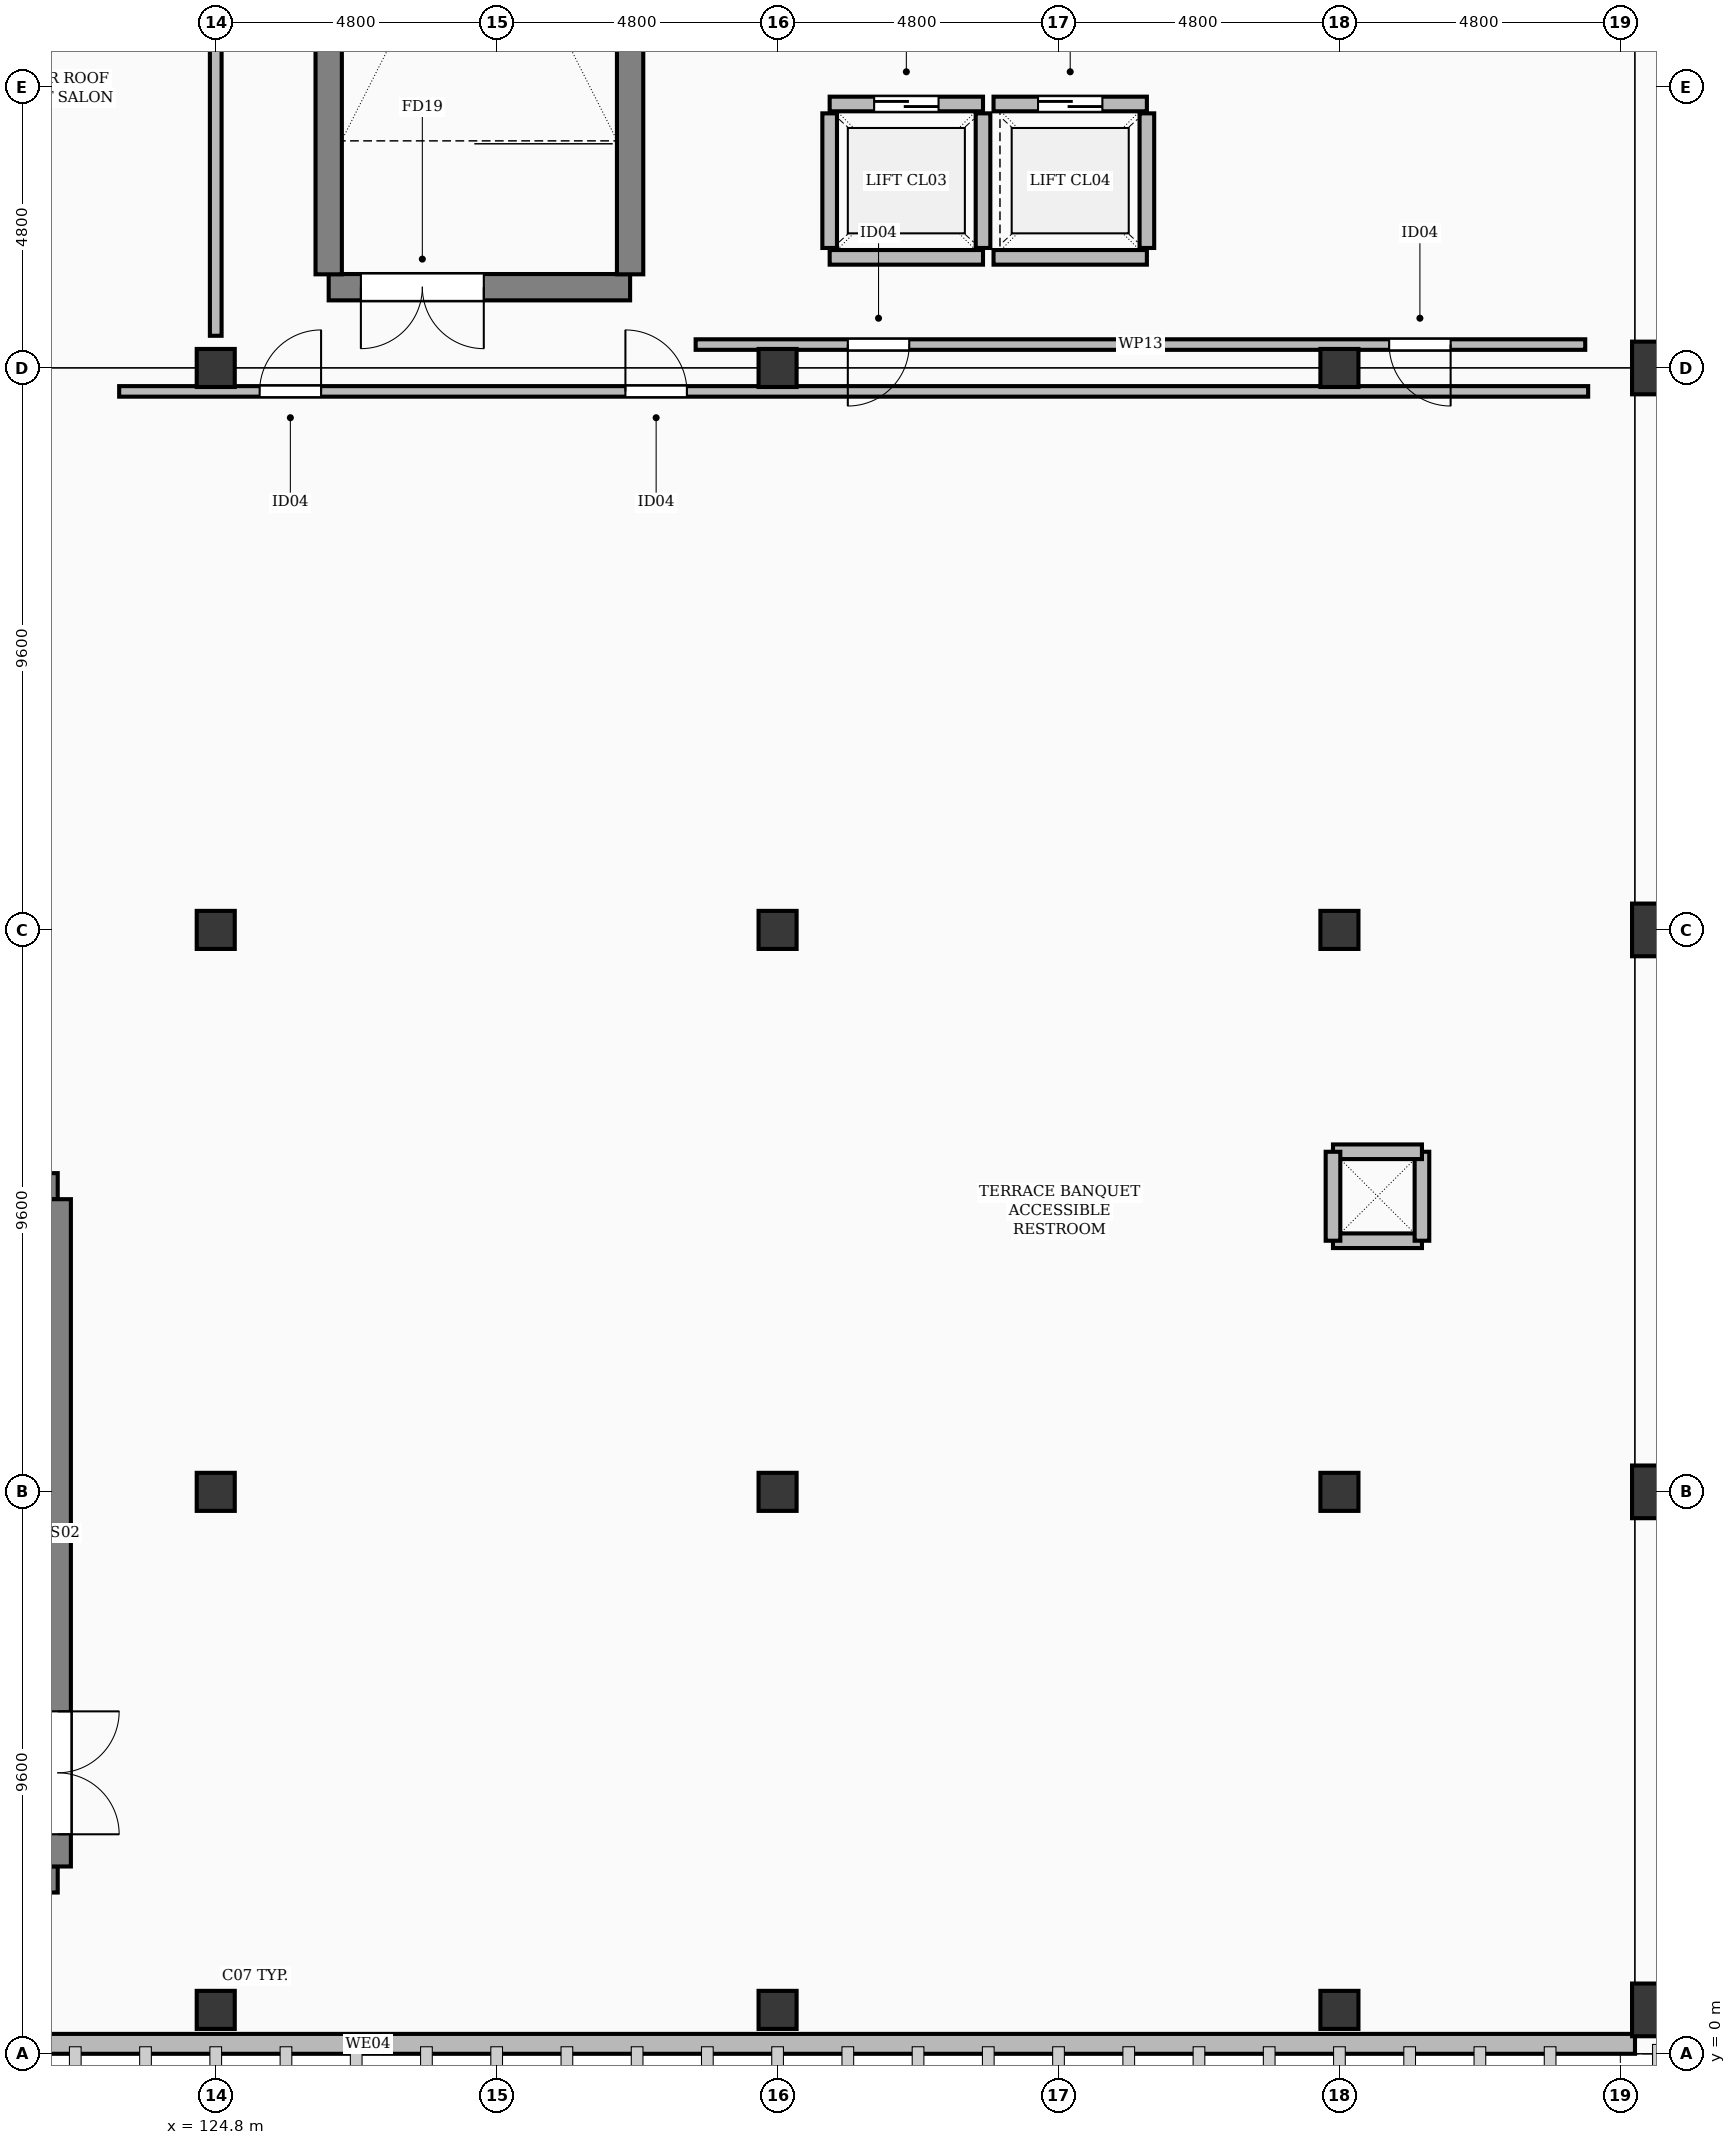
"""IFC4 building model, lengths in metres.
Left out: names, types, materials, properties, quantities, classifications, styles, units other than length and angle.
Written with IfcOpenShell. Run it as: python <this file> out.ifc"""

import sys

from ifc_helpers import new_model, si_unit, direction, frame, frame_2d, origin, origin_2d, place, context, subcontext, project, spatial, rectangle, extrude, element, fill, save


model = new_model("IFC4")
c1 = context("Model", 3, precision=1e-05, world=origin(), true_north=direction((0.0, 1.0)))
c2 = subcontext(c1, "Body", "Model", "MODEL_VIEW")
j1 = project(units=[si_unit("LENGTHUNIT", "METRE"), si_unit("PLANEANGLEUNIT", "RADIAN")], contexts=[c1])
p1 = place(None, origin())
s1 = spatial("IfcSite", under=j1, at=p1, CompositionType="ELEMENT")
p2 = place(p1, origin())
s2 = spatial("IfcBuilding", under=s1, at=p2, CompositionType="ELEMENT")
p3 = place(p2, frame((0.0, 0.0, 16.2)))
s3 = spatial("IfcBuildingStorey", under=s2, at=p3, CompositionType="ELEMENT", Elevation=16.2)
for number, where, z_axis, x_axis in (
    (1, (124.8, 0.75, 0.0), (0.0, 0.0, 1.0), (1.0, 0.0, 0.0)),
    (2, (124.8, 9.6, 0.0), (0.0, 0.0, 1.0), (1.0, 0.0, 0.0)),
    (3, (124.8, 19.2, 0.0), (0.0, 0.0, 1.0), (1.0, 0.0, 0.0)),
    (4, (124.8, 28.8, 0.0), (0.0, 0.0, 1.0), (1.0, 0.0, 0.0)),
    (5, (134.4, 0.75, 0.0), (0.0, 0.0, 1.0), (1.0, 0.0, 0.0)),
    (6, (134.4, 9.6, 0.0), (0.0, 0.0, 1.0), (1.0, 0.0, 0.0)),
    (7, (134.4, 19.2, 0.0), (0.0, 0.0, 1.0), (1.0, 0.0, 0.0)),
    (8, (134.4, 28.8, 0.0), (0.0, 0.0, 1.0), (1.0, 0.0, 0.0)),
    (9, (144.0, 0.75, 0.0), (0.0, 0.0, 1.0), (1.0, 0.0, 0.0)),
    (10, (144.0, 9.6, 0.0), (0.0, 0.0, 1.0), (1.0, 0.0, 0.0)),
    (11, (144.0, 19.2, 0.0), (0.0, 0.0, 1.0), (1.0, 0.0, 0.0)),
    (12, (144.0, 28.8, 0.0), (0.0, 0.0, 1.0), (1.0, 0.0, 0.0)),
):
    element("IfcColumn", number, at=place(p3, frame(where, z_axis=z_axis, x_axis=x_axis)), inside=s3, PredefinedType="COLUMN", context=c2, shape_type="SweptSolid", body=[
        extrude(rectangle(XDim=0.65, YDim=0.65, at=origin_2d()), origin(), (0.0, 0.0, 1.0), 4.8),
    ])
for number, where, z_axis, x_axis in (
    (13, (149.45, 0.75, 0.0), (0.0, 0.0, 1.0), (1.0, 0.0, 0.0)),
    (14, (149.45, 9.6, 0.0), (0.0, 0.0, 1.0), (1.0, 0.0, 0.0)),
    (15, (149.45, 19.2, 0.0), (0.0, 0.0, 1.0), (1.0, 0.0, 0.0)),
    (16, (149.45, 28.8, 0.0), (0.0, 0.0, 1.0), (1.0, 0.0, 0.0)),
):
    element("IfcColumn", number, at=place(p3, frame(where, z_axis=z_axis, x_axis=x_axis)), inside=s3, PredefinedType="COLUMN", context=c2, shape_type="SweptSolid", body=[
        extrude(rectangle(XDim=0.9, YDim=0.9, at=origin_2d()), origin(), (0.0, 0.0, 1.0), 4.8),
    ])
p4 = place(p3, frame((149.05, 0.17, 0.0), z_axis=(0.0, 0.0, 1.0), x_axis=(-1.0, 0.0, 0.0)))
e17 = element("IfcWall", 17, at=p4, inside=s3, PredefinedType="SOLIDWALL", context=c2, shape_type="SweptSolid", body=[
    extrude(rectangle(XDim=43.3, YDim=0.34, at=frame_2d((21.65, 0.0))), origin(), (0.0, 0.0, 1.0), 3.032),
])
p5 = place(p3, frame((126.73, 30.18, 0.0), z_axis=(0.0, 0.0, 1.0), x_axis=(1.0, 0.0, 0.0)))
e18 = element("IfcWall", 18, at=p5, inside=s3, PredefinedType="SHEAR", context=c2, shape_type="SweptSolid", body=[
    extrude(rectangle(XDim=5.15, YDim=0.45, at=frame_2d((2.575, 0.0))), origin(), (0.0, 0.0, 1.0), 4.54),
])
p6 = place(p5, frame((0.55, 0.0, 0.0)))
e19 = element("IfcOpeningElement", 19, at=p6, cuts=e18, PredefinedType="OPENING", context=c2, shape_type="SweptSolid", body=[
    extrude(rectangle(XDim=2.1, YDim=2.2, at=frame_2d((1.05, 1.1))), frame((0.0, 0.237, 0.0), z_axis=(0.0, -1.0, 0.0), x_axis=(1.0, 0.0, 0.0)), (0.0, 0.0, 1.0), 0.474),
])
for number, where, z_axis, x_axis in (
    (20, (126.73, 30.4, 0.0), (0.0, 0.0, 1.0), (0.0, 1.0, 0.0)),
    (21, (131.88, 30.4, 0.0), (0.0, 0.0, 1.0), (0.0, 1.0, 0.0)),
):
    element("IfcWall", number, at=place(p3, frame(where, z_axis=z_axis, x_axis=x_axis)), inside=s3, PredefinedType="SHEAR", context=c2, shape_type="SweptSolid", body=[
        extrude(rectangle(XDim=11.6, YDim=0.45, at=frame_2d((5.8, 0.0))), origin(), (0.0, 0.0, 1.0), 4.54),
    ])
p7 = place(p3, frame((135.29, 30.69, 0.0), z_axis=(0.0, 0.0, 1.0), x_axis=(1.0, 0.0, 0.0)))
e22 = element("IfcWall", 22, at=p7, inside=s3, PredefinedType="SOLIDWALL", context=c2, shape_type="SweptSolid", body=[
    extrude(rectangle(XDim=2.62, YDim=0.25, at=frame_2d((1.31, 0.0))), origin(), (0.0, 0.0, 1.0), 4.54),
])
p8 = place(p3, frame((135.29, 33.31, 0.0), z_axis=(0.0, 0.0, 1.0), x_axis=(1.0, 0.0, 0.0)))
e23 = element("IfcWall", 23, at=p8, inside=s3, PredefinedType="SOLIDWALL", context=c2, shape_type="SweptSolid", body=[
    extrude(rectangle(XDim=2.62, YDim=0.25, at=frame_2d((1.31, 0.0))), origin(), (0.0, 0.0, 1.0), 4.54),
])
p9 = place(p8, frame((0.76, 0.0, 0.0)))
e24 = element("IfcOpeningElement", 24, at=p9, cuts=e23, PredefinedType="OPENING", context=c2, shape_type="SweptSolid", body=[
    extrude(rectangle(XDim=1.1, YDim=2.2, at=frame_2d((0.55, 1.1))), frame((0.0, 0.137, 0.0), z_axis=(0.0, -1.0, 0.0), x_axis=(1.0, 0.0, 0.0)), (0.0, 0.0, 1.0), 0.274),
])
for number, where, z_axis, x_axis in (
    (25, (135.29, 30.85, 0.0), (0.0, 0.0, 1.0), (0.0, 1.0, 0.0)),
    (26, (137.91, 30.85, 0.0), (0.0, 0.0, 1.0), (0.0, 1.0, 0.0)),
):
    element("IfcWall", number, at=place(p3, frame(where, z_axis=z_axis, x_axis=x_axis)), inside=s3, PredefinedType="SOLIDWALL", context=c2, shape_type="SweptSolid", body=[
        extrude(rectangle(XDim=2.3, YDim=0.25, at=frame_2d((1.15, 0.0))), origin(), (0.0, 0.0, 1.0), 4.54),
    ])
p10 = place(p3, frame((138.09, 30.69, 0.0), z_axis=(0.0, 0.0, 1.0), x_axis=(1.0, 0.0, 0.0)))
e27 = element("IfcWall", 27, at=p10, inside=s3, PredefinedType="SOLIDWALL", context=c2, shape_type="SweptSolid", body=[
    extrude(rectangle(XDim=2.62, YDim=0.25, at=frame_2d((1.31, 0.0))), origin(), (0.0, 0.0, 1.0), 4.54),
])
p11 = place(p3, frame((138.09, 33.31, 0.0), z_axis=(0.0, 0.0, 1.0), x_axis=(1.0, 0.0, 0.0)))
e28 = element("IfcWall", 28, at=p11, inside=s3, PredefinedType="SOLIDWALL", context=c2, shape_type="SweptSolid", body=[
    extrude(rectangle(XDim=2.62, YDim=0.25, at=frame_2d((1.31, 0.0))), origin(), (0.0, 0.0, 1.0), 4.54),
])
p12 = place(p11, frame((0.76, 0.0, 0.0)))
e29 = element("IfcOpeningElement", 29, at=p12, cuts=e28, PredefinedType="OPENING", context=c2, shape_type="SweptSolid", body=[
    extrude(rectangle(XDim=1.1, YDim=2.2, at=frame_2d((0.55, 1.1))), frame((0.0, 0.137, 0.0), z_axis=(0.0, -1.0, 0.0), x_axis=(1.0, 0.0, 0.0)), (0.0, 0.0, 1.0), 0.274),
])
p13 = place(p3, frame((140.71, 30.85, 0.0), z_axis=(0.0, 0.0, 1.0), x_axis=(0.0, 1.0, 0.0)))
e30 = element("IfcWall", 30, at=p13, inside=s3, PredefinedType="SOLIDWALL", context=c2, shape_type="SweptSolid", body=[
    extrude(rectangle(XDim=2.3, YDim=0.25, at=frame_2d((1.15, 0.0))), origin(), (0.0, 0.0, 1.0), 4.54),
])
for number, where, z_axis, x_axis in (
    (31, (116.95, 2.98, 0.0), (0.0, 0.0, 1.0), (1.0, 0.0, 0.0)),
    (32, (116.95, 14.82, 0.0), (0.0, 0.0, 1.0), (1.0, 0.0, 0.0)),
):
    element("IfcWall", number, at=place(p3, frame(where, z_axis=z_axis, x_axis=x_axis)), inside=s3, PredefinedType="SHEAR", context=c2, shape_type="SweptSolid", body=[
        extrude(rectangle(XDim=5.15, YDim=0.45, at=frame_2d((2.575, 0.0))), origin(), (0.0, 0.0, 1.0), 4.54),
    ])
p14 = place(p3, frame((122.1, 3.2, 0.0), z_axis=(0.0, 0.0, 1.0), x_axis=(0.0, 1.0, 0.0)))
e33 = element("IfcWall", 33, at=p14, inside=s3, PredefinedType="SHEAR", context=c2, shape_type="SweptSolid", body=[
    extrude(rectangle(XDim=11.4, YDim=0.45, at=frame_2d((5.7, 0.0))), origin(), (0.0, 0.0, 1.0), 4.54),
])
p15 = place(p14, frame((0.55, 0.0, 0.0)))
e34 = element("IfcOpeningElement", 34, at=p15, cuts=e33, PredefinedType="OPENING", context=c2, shape_type="SweptSolid", body=[
    extrude(rectangle(XDim=2.1, YDim=2.2, at=frame_2d((1.05, 1.1))), frame((0.0, 0.237, 0.0), z_axis=(0.0, -1.0, 0.0), x_axis=(1.0, 0.0, 0.0)), (0.0, 0.0, 1.0), 0.474),
])
p16 = place(p3, frame((143.89, 13.89, 0.0), z_axis=(0.0, 0.0, 1.0), x_axis=(1.0, 0.0, 0.0)))
e35 = element("IfcWall", 35, at=p16, inside=s3, PredefinedType="SOLIDWALL", context=c2, shape_type="SweptSolid", body=[
    extrude(rectangle(XDim=1.52, YDim=0.25, at=frame_2d((0.76, 0.0))), origin(), (0.0, 0.0, 1.0), 3.732),
])
p17 = place(p3, frame((145.41, 13.89, 0.0), z_axis=(0.0, 0.0, 1.0), x_axis=(0.0, 1.0, 0.0)))
e36 = element("IfcWall", 36, at=p17, inside=s3, PredefinedType="SOLIDWALL", context=c2, shape_type="SweptSolid", body=[
    extrude(rectangle(XDim=1.52, YDim=0.25, at=frame_2d((0.76, 0.0))), origin(), (0.0, 0.0, 1.0), 4.54),
])
for number, where, z_axis, x_axis in (
    (37, (145.41, 15.41, 0.0), (0.0, 0.0, 1.0), (-1.0, 0.0, 0.0)),
    (38, (143.89, 15.41, 0.0), (0.0, 0.0, 1.0), (0.0, -1.0, 0.0)),
):
    element("IfcWall", number, at=place(p3, frame(where, z_axis=z_axis, x_axis=x_axis)), inside=s3, PredefinedType="SOLIDWALL", context=c2, shape_type="SweptSolid", body=[
        extrude(rectangle(XDim=1.52, YDim=0.25, at=frame_2d((0.76, 0.0))), origin(), (0.0, 0.0, 1.0), 3.732),
    ])
p18 = place(p3, frame((124.8, 29.35, 0.0), z_axis=(0.0, 0.0, 1.0), x_axis=(0.0, 1.0, 0.0)))
e39 = element("IfcWall", 39, at=p18, inside=s3, PredefinedType="PARTITIONING", context=c2, shape_type="SweptSolid", body=[
    extrude(rectangle(XDim=11.1, YDim=0.2, at=frame_2d((5.55, 0.0))), origin(), (0.0, 0.0, 1.0), 3.732),
])
p19 = place(p3, frame((133.0, 29.2, 0.0), z_axis=(0.0, 0.0, 1.0), x_axis=(1.0, 0.0, 0.0)))
e40 = element("IfcWall", 40, at=p19, inside=s3, PredefinedType="PARTITIONING", context=c2, shape_type="SweptSolid", body=[
    extrude(rectangle(XDim=15.2, YDim=0.18, at=frame_2d((7.6, 0.0))), origin(), (0.0, 0.0, 1.0), 3.732),
])
p20 = place(p19, frame((2.6, 0.0, 0.0)))
e41 = element("IfcOpeningElement", 41, at=p20, cuts=e40, PredefinedType="OPENING", context=c2, shape_type="SweptSolid", body=[
    extrude(rectangle(XDim=1.05, YDim=2.18, at=frame_2d((0.525, 1.09))), frame((0.0, 0.102, 0.0), z_axis=(0.0, -1.0, 0.0), x_axis=(1.0, 0.0, 0.0)), (0.0, 0.0, 1.0), 0.204),
])
p21 = place(p19, frame((11.85, 0.0, 0.0)))
e42 = element("IfcOpeningElement", 42, at=p21, cuts=e40, PredefinedType="OPENING", context=c2, shape_type="SweptSolid", body=[
    extrude(rectangle(XDim=1.05, YDim=2.18, at=frame_2d((0.525, 1.09))), frame((0.0, 0.102, 0.0), z_axis=(0.0, -1.0, 0.0), x_axis=(1.0, 0.0, 0.0)), (0.0, 0.0, 1.0), 0.204),
])
p22 = place(p3, frame((123.15, 28.4, 0.0), z_axis=(0.0, 0.0, 1.0), x_axis=(1.0, 0.0, 0.0)))
e43 = element("IfcWall", 43, at=p22, inside=s3, PredefinedType="PARTITIONING", context=c2, shape_type="SweptSolid", body=[
    extrude(rectangle(XDim=25.1, YDim=0.18, at=frame_2d((12.55, 0.0))), origin(), (0.0, 0.0, 1.0), 3.732),
])
p23 = place(p22, frame((2.4, 0.0, 0.0)))
e44 = element("IfcOpeningElement", 44, at=p23, cuts=e43, PredefinedType="OPENING", context=c2, shape_type="SweptSolid", body=[
    extrude(rectangle(XDim=1.05, YDim=2.18, at=frame_2d((0.525, 1.09))), frame((0.0, 0.102, 0.0), z_axis=(0.0, -1.0, 0.0), x_axis=(1.0, 0.0, 0.0)), (0.0, 0.0, 1.0), 0.204),
])
p24 = place(p22, frame((8.65, 0.0, 0.0)))
e45 = element("IfcOpeningElement", 45, at=p24, cuts=e43, PredefinedType="OPENING", context=c2, shape_type="SweptSolid", body=[
    extrude(rectangle(XDim=1.05, YDim=2.18, at=frame_2d((0.525, 1.09))), frame((0.0, 0.102, 0.0), z_axis=(0.0, -1.0, 0.0), x_axis=(1.0, 0.0, 0.0)), (0.0, 0.0, 1.0), 0.204),
])
p25 = place(p6, frame((2.1, 0.0, 0.0), z_axis=(0.0, 0.0, 1.0), x_axis=(-1.0, 0.0, 0.0)))
e46 = element("IfcDoor", 46, at=p25, inside=s3, OperationType="DOUBLE_DOOR_SINGLE_SWING", PredefinedType="DOOR", context=c2, shape_type="SweptSolid", body=[
    extrude(rectangle(XDim=2.1, YDim=2.2, at=frame_2d((1.05, 1.1))), frame((0.0, 0.025, 0.0), z_axis=(0.0, -1.0, 0.0), x_axis=(1.0, 0.0, 0.0)), (0.0, 0.0, 1.0), 0.05),
])
fill(e19, e46)
p26 = place(p9, origin())
e47 = element("IfcDoor", 47, at=p26, inside=s3, OperationType="SLIDING_TO_LEFT", PredefinedType="DOOR", context=c2, shape_type="SweptSolid", body=[
    extrude(rectangle(XDim=1.1, YDim=2.2, at=frame_2d((0.55, 1.1))), frame((0.0, 0.025, 0.0), z_axis=(0.0, -1.0, 0.0), x_axis=(1.0, 0.0, 0.0)), (0.0, 0.0, 1.0), 0.05),
])
fill(e24, e47)
p27 = place(p12, origin())
e48 = element("IfcDoor", 48, at=p27, inside=s3, OperationType="SLIDING_TO_LEFT", PredefinedType="DOOR", context=c2, shape_type="SweptSolid", body=[
    extrude(rectangle(XDim=1.1, YDim=2.2, at=frame_2d((0.55, 1.1))), frame((0.0, 0.025, 0.0), z_axis=(0.0, -1.0, 0.0), x_axis=(1.0, 0.0, 0.0)), (0.0, 0.0, 1.0), 0.05),
])
fill(e29, e48)
p28 = place(p15, frame((2.1, 0.0, 0.0), z_axis=(0.0, 0.0, 1.0), x_axis=(-1.0, 0.0, 0.0)))
e49 = element("IfcDoor", 49, at=p28, inside=s3, OperationType="DOUBLE_DOOR_SINGLE_SWING", PredefinedType="DOOR", context=c2, shape_type="SweptSolid", body=[
    extrude(rectangle(XDim=2.1, YDim=2.2, at=frame_2d((1.05, 1.1))), frame((0.0, 0.025, 0.0), z_axis=(0.0, -1.0, 0.0), x_axis=(1.0, 0.0, 0.0)), (0.0, 0.0, 1.0), 0.05),
])
fill(e34, e49)
p29 = place(p20, frame((1.05, 0.0, 0.0), z_axis=(0.0, 0.0, 1.0), x_axis=(-1.0, 0.0, 0.0)))
e50 = element("IfcDoor", 50, at=p29, inside=s3, OperationType="SINGLE_SWING_LEFT", PredefinedType="DOOR", context=c2, shape_type="SweptSolid", body=[
    extrude(rectangle(XDim=1.05, YDim=2.18, at=frame_2d((0.525, 1.09))), frame((0.0, 0.025, 0.0), z_axis=(0.0, -1.0, 0.0), x_axis=(1.0, 0.0, 0.0)), (0.0, 0.0, 1.0), 0.05),
])
fill(e41, e50)
p30 = place(p21, frame((1.05, 0.0, 0.0), z_axis=(0.0, 0.0, 1.0), x_axis=(-1.0, 0.0, 0.0)))
e51 = element("IfcDoor", 51, at=p30, inside=s3, OperationType="SINGLE_SWING_RIGHT", PredefinedType="DOOR", context=c2, shape_type="SweptSolid", body=[
    extrude(rectangle(XDim=1.05, YDim=2.18, at=frame_2d((0.525, 1.09))), frame((0.0, 0.025, 0.0), z_axis=(0.0, -1.0, 0.0), x_axis=(1.0, 0.0, 0.0)), (0.0, 0.0, 1.0), 0.05),
])
fill(e42, e51)
p31 = place(p23, origin())
e52 = element("IfcDoor", 52, at=p31, inside=s3, OperationType="SINGLE_SWING_RIGHT", PredefinedType="DOOR", context=c2, shape_type="SweptSolid", body=[
    extrude(rectangle(XDim=1.05, YDim=2.18, at=frame_2d((0.525, 1.09))), frame((0.0, 0.025, 0.0), z_axis=(0.0, -1.0, 0.0), x_axis=(1.0, 0.0, 0.0)), (0.0, 0.0, 1.0), 0.05),
])
fill(e44, e52)
p32 = place(p24, origin())
e53 = element("IfcDoor", 53, at=p32, inside=s3, OperationType="SINGLE_SWING_LEFT", PredefinedType="DOOR", context=c2, shape_type="SweptSolid", body=[
    extrude(rectangle(XDim=1.05, YDim=2.18, at=frame_2d((0.525, 1.09))), frame((0.0, 0.025, 0.0), z_axis=(0.0, -1.0, 0.0), x_axis=(1.0, 0.0, 0.0)), (0.0, 0.0, 1.0), 0.05),
])
fill(e45, e53)
save(model, sys.argv[1])
